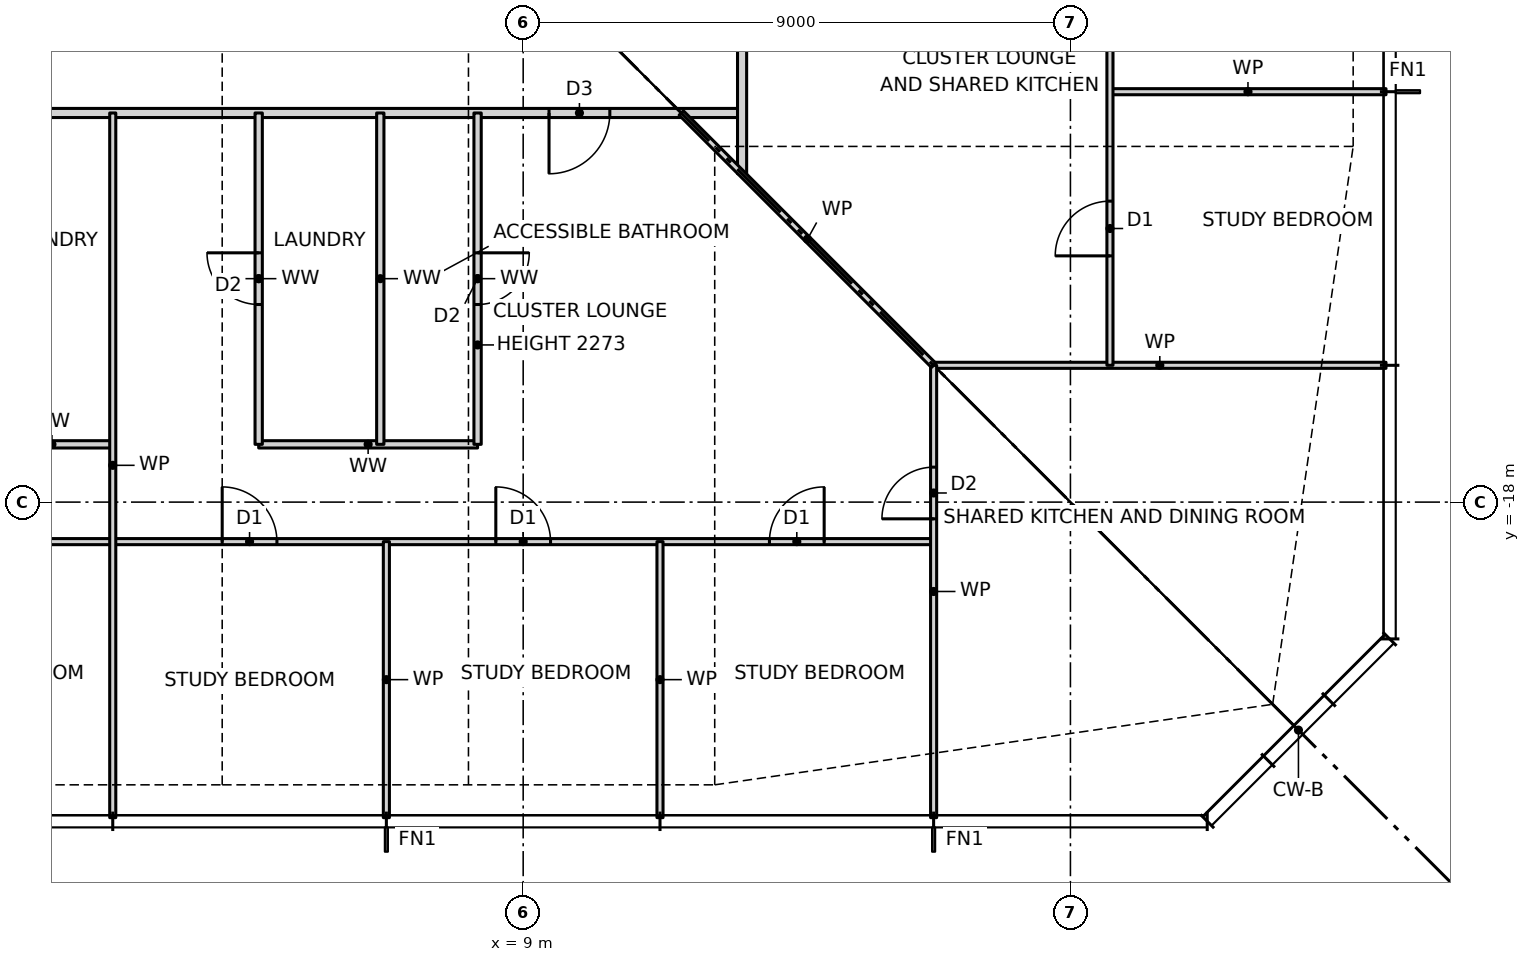
"""IFC4 building model, lengths in metres.
Left out: names, types, materials, properties, quantities, classifications, styles, units other than length and angle.
Written with IfcOpenShell. Run it as: python <this file> out.ifc"""

import sys

from ifc_helpers import new_model, si_unit, direction, frame, frame_2d, origin, place, context, subcontext, project, spatial, rectangle, extrude, element, fill, save


model = new_model("IFC4")
c1 = context("Model", 3, precision=1e-05, world=origin(), true_north=direction((0.0, 1.0)))
c2 = subcontext(c1, "Body", "Model", "MODEL_VIEW")
j1 = project(units=[si_unit("LENGTHUNIT", "METRE"), si_unit("PLANEANGLEUNIT", "RADIAN")], contexts=[c1])
p1 = place(None, origin())
s1 = spatial("IfcSite", under=j1, at=p1, CompositionType="ELEMENT")
p2 = place(p1, origin())
s2 = spatial("IfcBuilding", under=s1, at=p2, CompositionType="ELEMENT")
p3 = place(p2, frame((0.0, 0.0, 71.0)))
s3 = spatial("IfcBuildingStorey", under=s2, at=p3, CompositionType="ELEMENT", Elevation=71.0)
p4 = place(p3, frame((-15.75, -18.65, 0.0), z_axis=(0.0, 0.0, 1.0), x_axis=(1.0, 0.0, 0.0)))
e1 = element("IfcWall", 1, at=p4, inside=s3, PredefinedType="PARTITIONING", context=c2, shape_type="SweptSolid", body=[
    extrude(rectangle(XDim=31.5, YDim=0.1, at=frame_2d((15.75, 0.0))), origin(), (0.0, 0.0, 1.0), 3.2),
])
p5 = place(p4, frame((1.8, 0.0, 0.0)))
e2 = element("IfcOpeningElement", 2, at=p5, cuts=e1, PredefinedType="OPENING", context=c2, shape_type="SweptSolid", body=[
    extrude(rectangle(XDim=0.9, YDim=2.1, at=frame_2d((0.45, 1.05))), frame((0.0, 0.06, 0.0), z_axis=(0.0, -1.0, 0.0), x_axis=(1.0, 0.0, 0.0)), (0.0, 0.0, 1.0), 0.12),
])
p6 = place(p4, frame((6.3, 0.0, 0.0)))
e3 = element("IfcOpeningElement", 3, at=p6, cuts=e1, PredefinedType="OPENING", context=c2, shape_type="SweptSolid", body=[
    extrude(rectangle(XDim=0.9, YDim=2.1, at=frame_2d((0.45, 1.05))), frame((0.0, 0.06, 0.0), z_axis=(0.0, -1.0, 0.0), x_axis=(1.0, 0.0, 0.0)), (0.0, 0.0, 1.0), 0.12),
])
p7 = place(p4, frame((10.8, 0.0, 0.0)))
e4 = element("IfcOpeningElement", 4, at=p7, cuts=e1, PredefinedType="OPENING", context=c2, shape_type="SweptSolid", body=[
    extrude(rectangle(XDim=0.9, YDim=2.1, at=frame_2d((0.45, 1.05))), frame((0.0, 0.06, 0.0), z_axis=(0.0, -1.0, 0.0), x_axis=(1.0, 0.0, 0.0)), (0.0, 0.0, 1.0), 0.12),
])
p8 = place(p4, frame((15.3, 0.0, 0.0)))
e5 = element("IfcOpeningElement", 5, at=p8, cuts=e1, PredefinedType="OPENING", context=c2, shape_type="SweptSolid", body=[
    extrude(rectangle(XDim=0.9, YDim=2.1, at=frame_2d((0.45, 1.05))), frame((0.0, 0.06, 0.0), z_axis=(0.0, -1.0, 0.0), x_axis=(1.0, 0.0, 0.0)), (0.0, 0.0, 1.0), 0.12),
])
p9 = place(p4, frame((19.8, 0.0, 0.0)))
e6 = element("IfcOpeningElement", 6, at=p9, cuts=e1, PredefinedType="OPENING", context=c2, shape_type="SweptSolid", body=[
    extrude(rectangle(XDim=0.9, YDim=2.1, at=frame_2d((0.45, 1.05))), frame((0.0, 0.06, 0.0), z_axis=(0.0, -1.0, 0.0), x_axis=(1.0, 0.0, 0.0)), (0.0, 0.0, 1.0), 0.12),
])
p10 = place(p4, frame((24.3, 0.0, 0.0)))
e7 = element("IfcOpeningElement", 7, at=p10, cuts=e1, PredefinedType="OPENING", context=c2, shape_type="SweptSolid", body=[
    extrude(rectangle(XDim=0.9, YDim=2.1, at=frame_2d((0.45, 1.05))), frame((0.0, 0.06, 0.0), z_axis=(0.0, -1.0, 0.0), x_axis=(1.0, 0.0, 0.0)), (0.0, 0.0, 1.0), 0.12),
])
p11 = place(p4, frame((28.8, 0.0, 0.0)))
e8 = element("IfcOpeningElement", 8, at=p11, cuts=e1, PredefinedType="OPENING", context=c2, shape_type="SweptSolid", body=[
    extrude(rectangle(XDim=0.9, YDim=2.1, at=frame_2d((0.45, 1.05))), frame((0.0, 0.06, 0.0), z_axis=(0.0, -1.0, 0.0), x_axis=(1.0, 0.0, 0.0)), (0.0, 0.0, 1.0), 0.12),
])
p12 = place(p3, frame((0.25, -17.05, 0.0), z_axis=(0.0, 0.0, 1.0), x_axis=(1.0, 0.0, 0.0)))
e9 = element("IfcWall", 9, at=p12, inside=s3, PredefinedType="PARTITIONING", context=c2, shape_type="SweptSolid", body=[
    extrude(rectangle(XDim=2.0, YDim=0.12, at=frame_2d((1.0, 0.0))), origin(), (0.0, 0.0, 1.0), 3.2),
])
p13 = place(p3, frame((4.65, -17.05, 0.0), z_axis=(0.0, 0.0, 1.0), x_axis=(1.0, 0.0, 0.0)))
e10 = element("IfcWall", 10, at=p13, inside=s3, PredefinedType="PARTITIONING", context=c2, shape_type="SweptSolid", body=[
    extrude(rectangle(XDim=3.6, YDim=0.12, at=frame_2d((1.8, 0.0))), origin(), (0.0, 0.0, 1.0), 3.2),
])
p14 = place(p3, frame((15.75, -15.75, 0.0), z_axis=(0.0, 0.0, 1.0), x_axis=(1.0, 0.0, 0.0)))
e11 = element("IfcWall", 11, at=p14, inside=s3, PredefinedType="PARTITIONING", context=c2, shape_type="SweptSolid", body=[
    extrude(rectangle(XDim=7.44, YDim=0.1, at=frame_2d((3.72, 0.0))), origin(), (0.0, 0.0, 1.0), 3.2),
])
p15 = place(p3, frame((-11.6, -11.6, 0.0), z_axis=(0.0, 0.0, 1.0), x_axis=(1.0, 0.0, 0.0)))
e12 = element("IfcWall", 12, at=p15, inside=s3, PredefinedType="PARTITIONING", context=c2, shape_type="SweptSolid", body=[
    extrude(rectangle(XDim=24.2, YDim=0.15, at=frame_2d((12.1, 0.0))), origin(), (0.0, 0.0, 1.0), 3.2),
])
p16 = place(p15, frame((0.74, 0.0, 0.0)))
e13 = element("IfcOpeningElement", 13, at=p16, cuts=e12, PredefinedType="OPENING", context=c2, shape_type="SweptSolid", body=[
    extrude(rectangle(XDim=1.0, YDim=2.1, at=frame_2d((0.5, 1.05))), frame((0.0, 0.085, 0.0), z_axis=(0.0, -1.0, 0.0), x_axis=(1.0, 0.0, 0.0)), (0.0, 0.0, 1.0), 0.17),
])
p17 = place(p15, frame((21.025, 0.0, 0.0)))
e14 = element("IfcOpeningElement", 14, at=p17, cuts=e12, PredefinedType="OPENING", context=c2, shape_type="SweptSolid", body=[
    extrude(rectangle(XDim=1.0, YDim=2.1, at=frame_2d((0.5, 1.05))), frame((0.0, 0.085, 0.0), z_axis=(0.0, -1.0, 0.0), x_axis=(1.0, 0.0, 0.0)), (0.0, 0.0, 1.0), 0.17),
])
p18 = place(p3, frame((18.65, -11.25, 0.0), z_axis=(0.0, 0.0, 1.0), x_axis=(1.0, 0.0, 0.0)))
e15 = element("IfcWall", 15, at=p18, inside=s3, PredefinedType="PARTITIONING", context=c2, shape_type="SweptSolid", body=[
    extrude(rectangle(XDim=4.54, YDim=0.1, at=frame_2d((2.27, 0.0))), origin(), (0.0, 0.0, 1.0), 3.2),
])
p19 = place(p3, frame((18.65, -15.75, 0.0), z_axis=(0.0, 0.0, 1.0), x_axis=(0.0, 1.0, 0.0)))
e16 = element("IfcWall", 16, at=p19, inside=s3, PredefinedType="PARTITIONING", context=c2, shape_type="SweptSolid", body=[
    extrude(rectangle(XDim=27.0, YDim=0.1, at=frame_2d((13.5, 0.0))), origin(), (0.0, 0.0, 1.0), 3.2),
])
p20 = place(p19, frame((1.8, 0.0, 0.0)))
e17 = element("IfcOpeningElement", 17, at=p20, cuts=e16, PredefinedType="OPENING", context=c2, shape_type="SweptSolid", body=[
    extrude(rectangle(XDim=0.9, YDim=2.1, at=frame_2d((0.45, 1.05))), frame((0.0, 0.06, 0.0), z_axis=(0.0, -1.0, 0.0), x_axis=(1.0, 0.0, 0.0)), (0.0, 0.0, 1.0), 0.12),
])
p21 = place(p19, frame((6.3, 0.0, 0.0)))
e18 = element("IfcOpeningElement", 18, at=p21, cuts=e16, PredefinedType="OPENING", context=c2, shape_type="SweptSolid", body=[
    extrude(rectangle(XDim=0.9, YDim=2.1, at=frame_2d((0.45, 1.05))), frame((0.0, 0.06, 0.0), z_axis=(0.0, -1.0, 0.0), x_axis=(1.0, 0.0, 0.0)), (0.0, 0.0, 1.0), 0.12),
])
p22 = place(p19, frame((10.8, 0.0, 0.0)))
e19 = element("IfcOpeningElement", 19, at=p22, cuts=e16, PredefinedType="OPENING", context=c2, shape_type="SweptSolid", body=[
    extrude(rectangle(XDim=0.9, YDim=2.1, at=frame_2d((0.45, 1.05))), frame((0.0, 0.06, 0.0), z_axis=(0.0, -1.0, 0.0), x_axis=(1.0, 0.0, 0.0)), (0.0, 0.0, 1.0), 0.12),
])
p23 = place(p19, frame((15.3, 0.0, 0.0)))
e20 = element("IfcOpeningElement", 20, at=p23, cuts=e16, PredefinedType="OPENING", context=c2, shape_type="SweptSolid", body=[
    extrude(rectangle(XDim=0.9, YDim=2.1, at=frame_2d((0.45, 1.05))), frame((0.0, 0.06, 0.0), z_axis=(0.0, -1.0, 0.0), x_axis=(1.0, 0.0, 0.0)), (0.0, 0.0, 1.0), 0.12),
])
p24 = place(p19, frame((19.8, 0.0, 0.0)))
e21 = element("IfcOpeningElement", 21, at=p24, cuts=e16, PredefinedType="OPENING", context=c2, shape_type="SweptSolid", body=[
    extrude(rectangle(XDim=0.9, YDim=2.1, at=frame_2d((0.45, 1.05))), frame((0.0, 0.06, 0.0), z_axis=(0.0, -1.0, 0.0), x_axis=(1.0, 0.0, 0.0)), (0.0, 0.0, 1.0), 0.12),
])
p25 = place(p19, frame((24.3, 0.0, 0.0)))
e22 = element("IfcOpeningElement", 22, at=p25, cuts=e16, PredefinedType="OPENING", context=c2, shape_type="SweptSolid", body=[
    extrude(rectangle(XDim=0.9, YDim=2.1, at=frame_2d((0.45, 1.05))), frame((0.0, 0.06, 0.0), z_axis=(0.0, -1.0, 0.0), x_axis=(1.0, 0.0, 0.0)), (0.0, 0.0, 1.0), 0.12),
])
p26 = place(p3, frame((15.75, -23.19, 0.0), z_axis=(0.0, 0.0, 1.0), x_axis=(0.0, 1.0, 0.0)))
e23 = element("IfcWall", 23, at=p26, inside=s3, PredefinedType="PARTITIONING", context=c2, shape_type="SweptSolid", body=[
    extrude(rectangle(XDim=7.44, YDim=0.1, at=frame_2d((3.72, 0.0))), origin(), (0.0, 0.0, 1.0), 3.2),
])
p27 = place(p26, frame((4.915, 0.0, 0.0)))
e24 = element("IfcOpeningElement", 24, at=p27, cuts=e23, PredefinedType="OPENING", context=c2, shape_type="SweptSolid", body=[
    extrude(rectangle(XDim=0.85, YDim=2.1, at=frame_2d((0.425, 1.05))), frame((0.0, 0.06, 0.0), z_axis=(0.0, -1.0, 0.0), x_axis=(1.0, 0.0, 0.0)), (0.0, 0.0, 1.0), 0.12),
])
p28 = place(p3, frame((12.6, -12.6, 0.0), z_axis=(0.0, 0.0, 1.0), x_axis=(0.0, 1.0, 0.0)))
e25 = element("IfcWall", 25, at=p28, inside=s3, PredefinedType="PARTITIONING", context=c2, shape_type="SweptSolid", body=[
    extrude(rectangle(XDim=25.2, YDim=0.15, at=frame_2d((12.6, 0.0))), origin(), (0.0, 0.0, 1.0), 3.2),
])
p29 = place(p28, frame((17.05, 0.0, 0.0)))
e26 = element("IfcOpeningElement", 26, at=p29, cuts=e25, PredefinedType="OPENING", context=c2, shape_type="SweptSolid", body=[
    extrude(rectangle(XDim=1.0, YDim=2.1, at=frame_2d((0.5, 1.05))), frame((0.0, 0.085, 0.0), z_axis=(0.0, -1.0, 0.0), x_axis=(1.0, 0.0, 0.0)), (0.0, 0.0, 1.0), 0.17),
])
p30 = place(p3, frame((11.25, -23.19, 0.0), z_axis=(0.0, 0.0, 1.0), x_axis=(0.0, 1.0, 0.0)))
e27 = element("IfcWall", 27, at=p30, inside=s3, PredefinedType="PARTITIONING", context=c2, shape_type="SweptSolid", body=[
    extrude(rectangle(XDim=4.54, YDim=0.1, at=frame_2d((2.27, 0.0))), origin(), (0.0, 0.0, 1.0), 3.2),
])
p31 = place(p3, frame((8.25, -17.05, 0.0), z_axis=(0.0, 0.0, 1.0), x_axis=(0.0, 1.0, 0.0)))
e28 = element("IfcWall", 28, at=p31, inside=s3, PredefinedType="PARTITIONING", context=c2, shape_type="SweptSolid", body=[
    extrude(rectangle(XDim=5.45, YDim=0.12, at=frame_2d((2.725, 0.0))), origin(), (0.0, 0.0, 1.0), 2.273),
])
p32 = place(p31, frame((2.3, 0.0, 0.0)))
e29 = element("IfcOpeningElement", 29, at=p32, cuts=e28, PredefinedType="OPENING", context=c2, shape_type="SweptSolid", body=[
    extrude(rectangle(XDim=0.85, YDim=2.1, at=frame_2d((0.425, 1.05))), frame((0.0, 0.07, 0.0), z_axis=(0.0, -1.0, 0.0), x_axis=(1.0, 0.0, 0.0)), (0.0, 0.0, 1.0), 0.14),
])
p33 = place(p3, frame((6.75, -23.19, 0.0), z_axis=(0.0, 0.0, 1.0), x_axis=(0.0, 1.0, 0.0)))
e30 = element("IfcWall", 30, at=p33, inside=s3, PredefinedType="PARTITIONING", context=c2, shape_type="SweptSolid", body=[
    extrude(rectangle(XDim=4.54, YDim=0.1, at=frame_2d((2.27, 0.0))), origin(), (0.0, 0.0, 1.0), 3.2),
])
p34 = place(p3, frame((6.65, -17.05, 0.0), z_axis=(0.0, 0.0, 1.0), x_axis=(0.0, 1.0, 0.0)))
e31 = element("IfcWall", 31, at=p34, inside=s3, PredefinedType="PARTITIONING", context=c2, shape_type="SweptSolid", body=[
    extrude(rectangle(XDim=5.45, YDim=0.12, at=frame_2d((2.725, 0.0))), origin(), (0.0, 0.0, 1.0), 3.2),
])
p35 = place(p3, frame((4.65, -17.05, 0.0), z_axis=(0.0, 0.0, 1.0), x_axis=(0.0, 1.0, 0.0)))
e32 = element("IfcWall", 32, at=p35, inside=s3, PredefinedType="PARTITIONING", context=c2, shape_type="SweptSolid", body=[
    extrude(rectangle(XDim=5.45, YDim=0.12, at=frame_2d((2.725, 0.0))), origin(), (0.0, 0.0, 1.0), 3.2),
])
p36 = place(p35, frame((2.3, 0.0, 0.0)))
e33 = element("IfcOpeningElement", 33, at=p36, cuts=e32, PredefinedType="OPENING", context=c2, shape_type="SweptSolid", body=[
    extrude(rectangle(XDim=0.85, YDim=2.1, at=frame_2d((0.425, 1.05))), frame((0.0, 0.07, 0.0), z_axis=(0.0, -1.0, 0.0), x_axis=(1.0, 0.0, 0.0)), (0.0, 0.0, 1.0), 0.14),
])
p37 = place(p3, frame((2.25, -23.19, 0.0), z_axis=(0.0, 0.0, 1.0), x_axis=(0.0, 1.0, 0.0)))
e34 = element("IfcWall", 34, at=p37, inside=s3, PredefinedType="PARTITIONING", context=c2, shape_type="SweptSolid", body=[
    extrude(rectangle(XDim=11.59, YDim=0.1, at=frame_2d((5.795, 0.0))), origin(), (0.0, 0.0, 1.0), 3.2),
])
p38 = place(p3, frame((15.75, -15.75, 0.0), z_axis=(0.0, 0.0, 1.0), x_axis=(-0.707106781187, 0.707106781187, 0.0)))
e35 = element("IfcWall", 35, at=p38, inside=s3, PredefinedType="PARTITIONING", context=c2, shape_type="SweptSolid", body=[
    extrude(rectangle(XDim=5.869, YDim=0.1, at=frame_2d((2.935, 0.0))), origin(), (0.0, 0.0, 1.0), 3.2),
])
p39 = place(p9, origin())
e36 = element("IfcDoor", 36, at=p39, inside=s3, OperationType="SINGLE_SWING_LEFT", PredefinedType="DOOR", context=c2, shape_type="SweptSolid", body=[
    extrude(rectangle(XDim=0.9, YDim=2.1, at=frame_2d((0.45, 1.05))), frame((0.0, 0.025, 0.0), z_axis=(0.0, -1.0, 0.0), x_axis=(1.0, 0.0, 0.0)), (0.0, 0.0, 1.0), 0.05),
])
fill(e6, e36)
p40 = place(p10, origin())
e37 = element("IfcDoor", 37, at=p40, inside=s3, OperationType="SINGLE_SWING_LEFT", PredefinedType="DOOR", context=c2, shape_type="SweptSolid", body=[
    extrude(rectangle(XDim=0.9, YDim=2.1, at=frame_2d((0.45, 1.05))), frame((0.0, 0.025, 0.0), z_axis=(0.0, -1.0, 0.0), x_axis=(1.0, 0.0, 0.0)), (0.0, 0.0, 1.0), 0.05),
])
fill(e7, e37)
p41 = place(p11, origin())
e38 = element("IfcDoor", 38, at=p41, inside=s3, OperationType="SINGLE_SWING_RIGHT", PredefinedType="DOOR", context=c2, shape_type="SweptSolid", body=[
    extrude(rectangle(XDim=0.9, YDim=2.1, at=frame_2d((0.45, 1.05))), frame((0.0, 0.025, 0.0), z_axis=(0.0, -1.0, 0.0), x_axis=(1.0, 0.0, 0.0)), (0.0, 0.0, 1.0), 0.05),
])
fill(e8, e38)
p42 = place(p17, frame((1.0, 0.0, 0.0), z_axis=(0.0, 0.0, 1.0), x_axis=(-1.0, 0.0, 0.0)))
e39 = element("IfcDoor", 39, at=p42, inside=s3, OperationType="SINGLE_SWING_RIGHT", PredefinedType="DOOR", context=c2, shape_type="SweptSolid", body=[
    extrude(rectangle(XDim=1.0, YDim=2.1, at=frame_2d((0.5, 1.05))), frame((0.0, 0.025, 0.0), z_axis=(0.0, -1.0, 0.0), x_axis=(1.0, 0.0, 0.0)), (0.0, 0.0, 1.0), 0.05),
])
fill(e14, e39)
p43 = place(p36, origin())
e40 = element("IfcDoor", 40, at=p43, inside=s3, OperationType="SINGLE_SWING_RIGHT", PredefinedType="DOOR", context=c2, shape_type="SweptSolid", body=[
    extrude(rectangle(XDim=0.85, YDim=2.1, at=frame_2d((0.425, 1.05))), frame((0.0, 0.025, 0.0), z_axis=(0.0, -1.0, 0.0), x_axis=(1.0, 0.0, 0.0)), (0.0, 0.0, 1.0), 0.05),
])
fill(e33, e40)
p44 = place(p32, frame((0.85, 0.0, 0.0), z_axis=(0.0, 0.0, 1.0), x_axis=(-1.0, 0.0, 0.0)))
e41 = element("IfcDoor", 41, at=p44, inside=s3, OperationType="SINGLE_SWING_LEFT", PredefinedType="DOOR", context=c2, shape_type="SweptSolid", body=[
    extrude(rectangle(XDim=0.85, YDim=2.1, at=frame_2d((0.425, 1.05))), frame((0.0, 0.025, 0.0), z_axis=(0.0, -1.0, 0.0), x_axis=(1.0, 0.0, 0.0)), (0.0, 0.0, 1.0), 0.05),
])
fill(e29, e41)
p45 = place(p20, origin())
e42 = element("IfcDoor", 42, at=p45, inside=s3, OperationType="SINGLE_SWING_LEFT", PredefinedType="DOOR", context=c2, shape_type="SweptSolid", body=[
    extrude(rectangle(XDim=0.9, YDim=2.1, at=frame_2d((0.45, 1.05))), frame((0.0, 0.025, 0.0), z_axis=(0.0, -1.0, 0.0), x_axis=(1.0, 0.0, 0.0)), (0.0, 0.0, 1.0), 0.05),
])
fill(e17, e42)
p46 = place(p27, origin())
e43 = element("IfcDoor", 43, at=p46, inside=s3, OperationType="SINGLE_SWING_LEFT", PredefinedType="DOOR", context=c2, shape_type="SweptSolid", body=[
    extrude(rectangle(XDim=0.85, YDim=2.1, at=frame_2d((0.425, 1.05))), frame((0.0, 0.025, 0.0), z_axis=(0.0, -1.0, 0.0), x_axis=(1.0, 0.0, 0.0)), (0.0, 0.0, 1.0), 0.05),
])
fill(e24, e43)
save(model, sys.argv[1])
